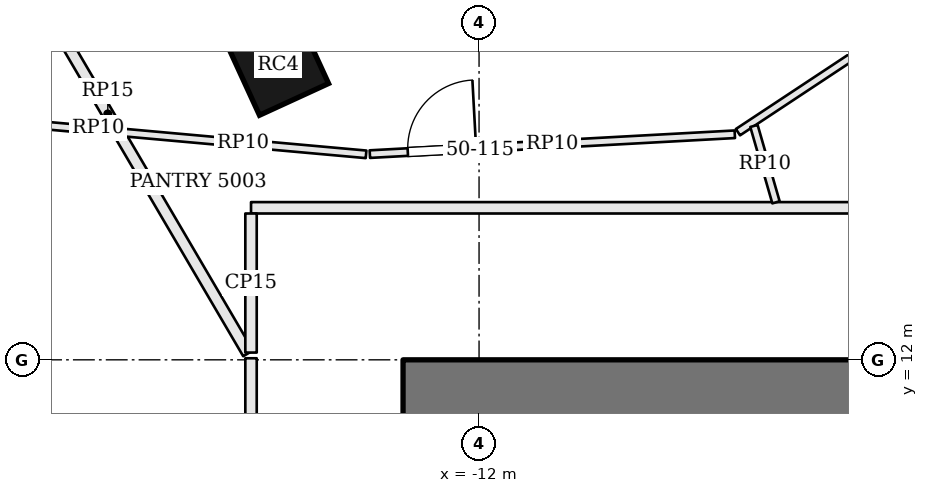
"""IFC4 building model, lengths in metres.
Left out: names, types, materials, properties, quantities, classifications, styles, units other than length and angle.
Written with IfcOpenShell. Run it as: python <this file> out.ifc"""

import sys

from ifc_helpers import new_model, si_unit, direction, frame, frame_2d, origin, origin_2d, place, context, subcontext, project, spatial, rectangle, extrude, element, fill, save


model = new_model("IFC4")
c1 = context("Model", 3, precision=1e-05, world=origin(), true_north=direction((0.0, 1.0)))
c2 = subcontext(c1, "Body", "Model", "MODEL_VIEW")
j1 = project(units=[si_unit("LENGTHUNIT", "METRE"), si_unit("PLANEANGLEUNIT", "RADIAN")], contexts=[c1])
p1 = place(None, origin())
s1 = spatial("IfcSite", under=j1, at=p1, CompositionType="ELEMENT")
p2 = place(p1, origin())
s2 = spatial("IfcBuilding", under=s1, at=p2, CompositionType="ELEMENT")
p3 = place(p2, frame((0.0, 0.0, 205.2)))
s3 = spatial("IfcBuildingStorey", under=s2, at=p3, CompositionType="ELEMENT", Elevation=205.2)
p4 = place(p3, frame((-13.0, 11.6, 0.0), z_axis=(0.0, 0.0, 1.0), x_axis=(1.0, 0.0, 0.0)))
e1 = element("IfcWall", 1, at=p4, inside=s3, PredefinedType="SHEAR", context=c2, shape_type="SweptSolid", body=[
    extrude(rectangle(XDim=26.0, YDim=0.8, at=frame_2d((13.0, 0.0))), origin(), (0.0, 0.0, 1.0), 3.9),
])
p5 = place(p4, frame((9.225, 0.0, 0.0)))
e2 = element("IfcOpeningElement", 2, at=p5, cuts=e1, PredefinedType="OPENING", context=c2, shape_type="SweptSolid", body=[
    extrude(rectangle(XDim=1.0, YDim=2.1, at=frame_2d((0.5, 1.05))), frame((0.0, 0.41, 0.0), z_axis=(0.0, -1.0, 0.0), x_axis=(1.0, 0.0, 0.0)), (0.0, 0.0, 1.0), 0.82),
])
p6 = place(p4, frame((11.825, 0.0, 0.0)))
e3 = element("IfcOpeningElement", 3, at=p6, cuts=e1, PredefinedType="OPENING", context=c2, shape_type="SweptSolid", body=[
    extrude(rectangle(XDim=0.7, YDim=2.1, at=frame_2d((0.35, 1.05))), frame((0.0, 0.41, 0.0), z_axis=(0.0, -1.0, 0.0), x_axis=(1.0, 0.0, 0.0)), (0.0, 0.0, 1.0), 0.82),
])
p7 = place(p4, frame((14.125, 0.0, 0.0)))
e4 = element("IfcOpeningElement", 4, at=p7, cuts=e1, PredefinedType="OPENING", context=c2, shape_type="SweptSolid", body=[
    extrude(rectangle(XDim=1.0, YDim=2.1, at=frame_2d((0.5, 1.05))), frame((0.0, 0.41, 0.0), z_axis=(0.0, -1.0, 0.0), x_axis=(1.0, 0.0, 0.0)), (0.0, 0.0, 1.0), 0.82),
])
p8 = place(p4, frame((16.625, 0.0, 0.0)))
e5 = element("IfcOpeningElement", 5, at=p8, cuts=e1, PredefinedType="OPENING", context=c2, shape_type="SweptSolid", body=[
    extrude(rectangle(XDim=0.9, YDim=2.1, at=frame_2d((0.45, 1.05))), frame((0.0, 0.41, 0.0), z_axis=(0.0, -1.0, 0.0), x_axis=(1.0, 0.0, 0.0)), (0.0, 0.0, 1.0), 0.82),
])
p9 = place(p3, frame((-14.643, 15.881, 0.0), z_axis=(0.0, 0.0, 1.0), x_axis=(-0.908778580451, -0.417278673927, 0.0)))
e6 = element("IfcColumn", 6, at=p9, inside=s3, PredefinedType="COLUMN", context=c2, shape_type="SweptSolid", body=[
    extrude(rectangle(XDim=1.0, YDim=1.0, at=origin_2d()), origin(), (0.0, 0.0, 1.0), 3.9),
])
p10 = place(p3, frame((-15.0, 12.021, 0.0), z_axis=(0.0, 0.0, 1.0), x_axis=(0.0, -1.0, 0.0)))
e7 = element("IfcWall", 7, at=p10, inside=s3, PredefinedType="PARTITIONING", context=c2, shape_type="SweptSolid", body=[
    extrude(rectangle(XDim=1.899, YDim=0.15, at=frame_2d((0.949, 0.0))), origin(), (0.0, 0.0, 1.0), 3.084),
])
p11 = place(p3, frame((-18.73, 18.384, 0.0), z_axis=(0.0, 0.0, 1.0), x_axis=(0.505745245261, -0.862682877363, 0.0)))
e8 = element("IfcWall", 8, at=p11, inside=s3, PredefinedType="PARTITIONING", context=c2, shape_type="SweptSolid", body=[
    extrude(rectangle(XDim=7.301, YDim=0.15, at=frame_2d((3.65, 0.0))), origin(), (0.0, 0.0, 1.0), 3.184),
])
p12 = place(p3, frame((14.925, 14.0, 0.0), z_axis=(0.0, 0.0, 1.0), x_axis=(-1.0, 0.0, 0.0)))
e9 = element("IfcWall", 9, at=p12, inside=s3, PredefinedType="PARTITIONING", context=c2, shape_type="SweptSolid", body=[
    extrude(rectangle(XDim=29.925, YDim=0.15, at=frame_2d((14.962, 0.0))), origin(), (0.0, 0.0, 1.0), 3.084),
])
p13 = place(p12, frame((1.699, 0.0, 0.0)))
e10 = element("IfcOpeningElement", 10, at=p13, cuts=e9, PredefinedType="OPENING", context=c2, shape_type="SweptSolid", body=[
    extrude(rectangle(XDim=1.0, YDim=2.4, at=frame_2d((0.5, 1.2))), frame((0.0, 0.085, 0.0), z_axis=(0.0, -1.0, 0.0), x_axis=(1.0, 0.0, 0.0)), (0.0, 0.0, 1.0), 0.17),
])
p14 = place(p12, frame((10.223, 0.0, 0.0)))
e11 = element("IfcOpeningElement", 11, at=p14, cuts=e9, PredefinedType="OPENING", context=c2, shape_type="SweptSolid", body=[
    extrude(rectangle(XDim=1.0, YDim=2.4, at=frame_2d((0.5, 1.2))), frame((0.0, 0.085, 0.0), z_axis=(0.0, -1.0, 0.0), x_axis=(1.0, 0.0, 0.0)), (0.0, 0.0, 1.0), 0.17),
])
p15 = place(p12, frame((18.49, 0.0, 0.0)))
e12 = element("IfcOpeningElement", 12, at=p15, cuts=e9, PredefinedType="OPENING", context=c2, shape_type="SweptSolid", body=[
    extrude(rectangle(XDim=1.0, YDim=2.4, at=frame_2d((0.5, 1.2))), frame((0.0, 0.085, 0.0), z_axis=(0.0, -1.0, 0.0), x_axis=(1.0, 0.0, 0.0)), (0.0, 0.0, 1.0), 0.17),
])
p16 = place(p3, frame((-15.0, 13.925, 0.0), z_axis=(0.0, 0.0, 1.0), x_axis=(0.0, -1.0, 0.0)))
e13 = element("IfcWall", 13, at=p16, inside=s3, PredefinedType="PARTITIONING", context=c2, shape_type="SweptSolid", body=[
    extrude(rectangle(XDim=1.83, YDim=0.15, at=frame_2d((0.915, 0.0))), origin(), (0.0, 0.0, 1.0), 3.084),
])
p17 = place(p3, frame((-17.85, 15.096, 0.0), z_axis=(0.0, 0.0, 1.0), x_axis=(0.995966605389, -0.089724695315, 0.0)))
e14 = element("IfcWall", 14, at=p17, inside=s3, PredefinedType="PARTITIONING", context=c2, shape_type="SweptSolid", body=[
    extrude(rectangle(XDim=1.086, YDim=0.1, at=frame_2d((0.543, 0.0))), origin(), (0.0, 0.0, 1.0), 3.084),
])
p18 = place(p3, frame((-16.72, 14.994, 0.0), z_axis=(0.0, 0.0, 1.0), x_axis=(0.9959948888, -0.089410186696, 0.0)))
e15 = element("IfcWall", 15, at=p18, inside=s3, PredefinedType="PARTITIONING", context=c2, shape_type="SweptSolid", body=[
    extrude(rectangle(XDim=3.247, YDim=0.1, at=frame_2d((1.623, 0.0))), origin(), (0.0, 0.0, 1.0), 3.084),
])
p19 = place(p3, frame((-13.437, 14.706, 0.0), z_axis=(0.0, 0.0, 1.0), x_axis=(0.998525882111, 0.054277645072, 0.0)))
e16 = element("IfcWall", 16, at=p19, inside=s3, PredefinedType="PARTITIONING", context=c2, shape_type="SweptSolid", body=[
    extrude(rectangle(XDim=4.808, YDim=0.1, at=frame_2d((2.404, 0.0))), origin(), (0.0, 0.0, 1.0), 3.084),
])
p20 = place(p19, frame((0.5, 0.0, 0.0)))
e17 = element("IfcOpeningElement", 17, at=p20, cuts=e16, PredefinedType="OPENING", context=c2, shape_type="SweptSolid", body=[
    extrude(rectangle(XDim=0.9, YDim=2.1, at=frame_2d((0.45, 1.05))), frame((0.0, 0.06, 0.0), z_axis=(0.0, -1.0, 0.0), x_axis=(1.0, 0.0, 0.0)), (0.0, 0.0, 1.0), 0.12),
])
p21 = place(p3, frame((-8.594, 14.995, 0.0), z_axis=(0.0, 0.0, 1.0), x_axis=(0.834061061321, 0.551672136316, 0.0)))
e18 = element("IfcWall", 18, at=p21, inside=s3, PredefinedType="PARTITIONING", context=c2, shape_type="SweptSolid", body=[
    extrude(rectangle(XDim=4.359, YDim=0.1, at=frame_2d((2.18, 0.0))), origin(), (0.0, 0.0, 1.0), 3.084),
])
p22 = place(p3, frame((-8.094, 14.072, 0.0), z_axis=(0.0, 0.0, 1.0), x_axis=(-0.27703220146, 0.96086063472, 0.0)))
e19 = element("IfcWall", 19, at=p22, inside=s3, PredefinedType="PARTITIONING", context=c2, shape_type="SweptSolid", body=[
    extrude(rectangle(XDim=1.046, YDim=0.1, at=frame_2d((0.523, 0.0))), origin(), (0.0, 0.0, 1.0), 3.084),
])
p23 = place(p20, origin())
e20 = element("IfcDoor", 20, at=p23, inside=s3, OperationType="SINGLE_SWING_RIGHT", PredefinedType="DOOR", context=c2, shape_type="SweptSolid", body=[
    extrude(rectangle(XDim=0.9, YDim=2.1, at=frame_2d((0.45, 1.05))), frame((0.0, 0.025, 0.0), z_axis=(0.0, -1.0, 0.0), x_axis=(1.0, 0.0, 0.0)), (0.0, 0.0, 1.0), 0.05),
])
fill(e17, e20)
save(model, sys.argv[1])
